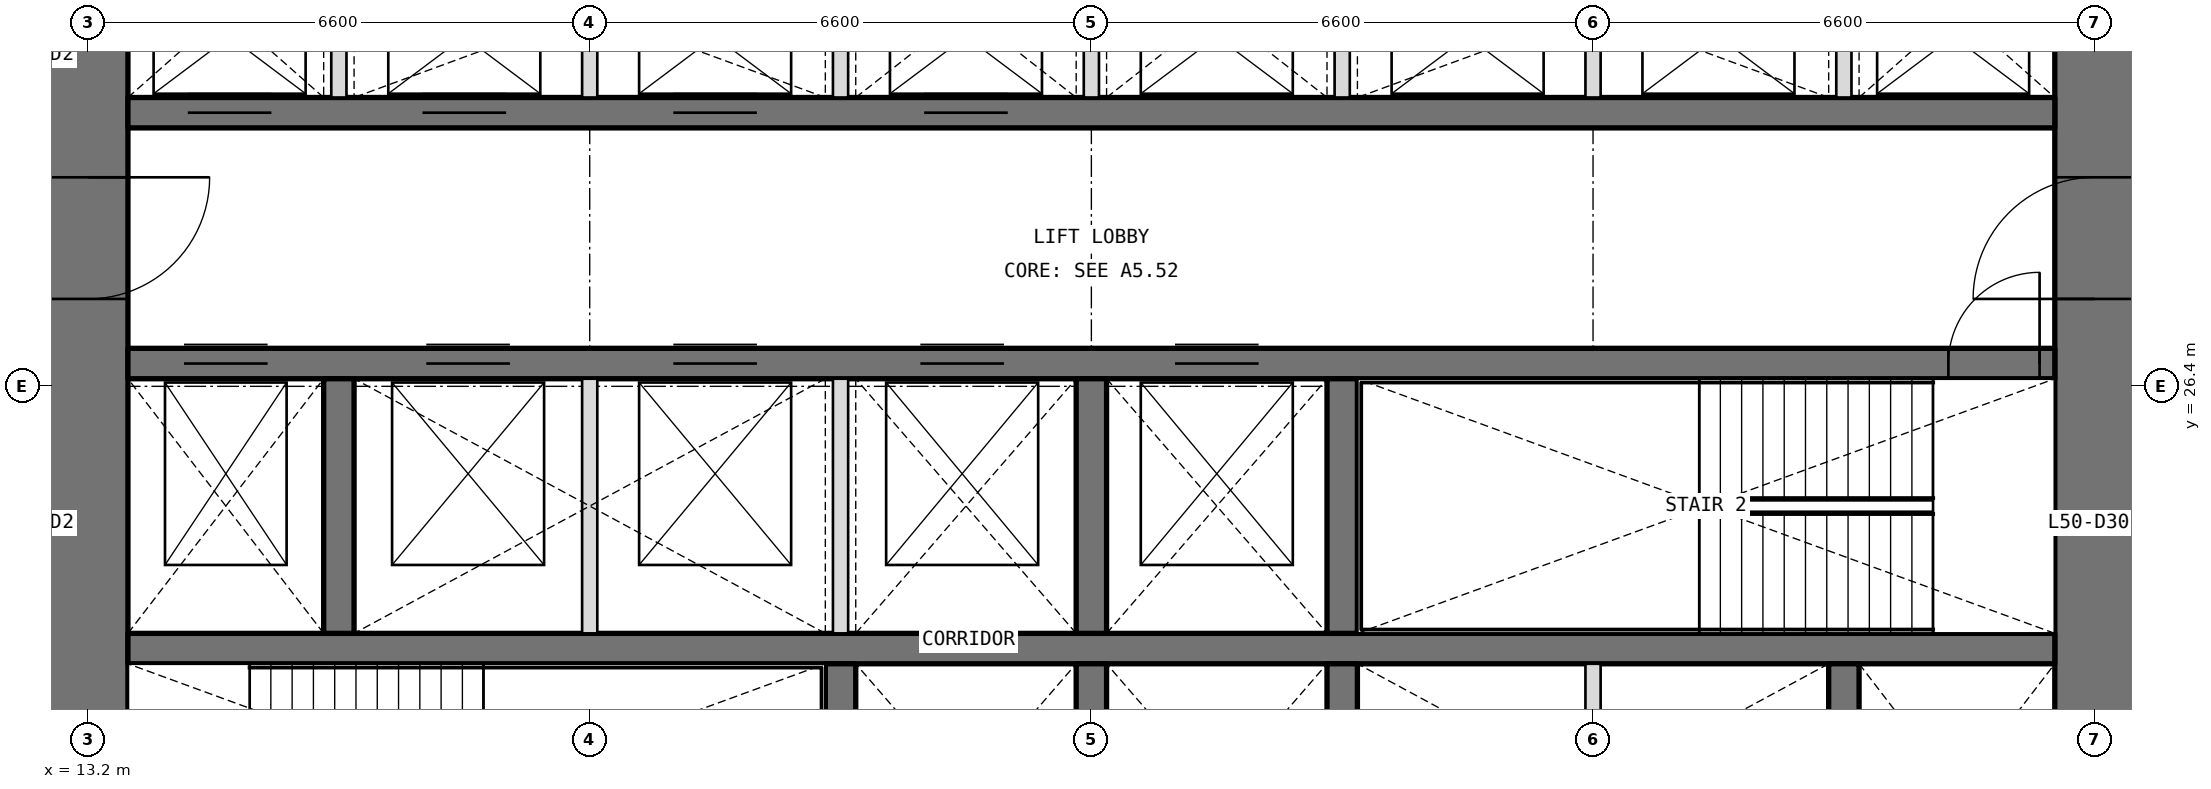
"""IFC4 building model, lengths in metres.
Left out: names, types, materials, properties, quantities, classifications, styles, units other than length and angle.
Written with IfcOpenShell. Run it as: python <this file> out.ifc"""

import sys

from ifc_helpers import new_model, si_unit, direction, frame, frame_2d, origin, place, context, subcontext, project, spatial, rectangle, extrude, element, fill, save


model = new_model("IFC4")
c1 = context("Model", 3, precision=1e-05, world=origin(), true_north=direction((0.0, 1.0)))
c2 = subcontext(c1, "Body", "Model", "MODEL_VIEW")
j1 = project(units=[si_unit("LENGTHUNIT", "METRE"), si_unit("PLANEANGLEUNIT", "RADIAN")], contexts=[c1])
p1 = place(None, origin())
s1 = spatial("IfcSite", under=j1, at=p1, CompositionType="ELEMENT")
p2 = place(p1, origin())
s2 = spatial("IfcBuilding", under=s1, at=p2, CompositionType="ELEMENT")
p3 = place(p2, frame((0.0, 0.0, 218.7)))
s3 = spatial("IfcBuildingStorey", under=s2, at=p3, CompositionType="ELEMENT", Elevation=218.7)
p4 = place(p3, frame((39.6, 13.725, 0.0), z_axis=(0.0, 0.0, 1.0), x_axis=(0.0, 1.0, 0.0)))
e1 = element("IfcWall", 1, at=p4, inside=s3, PredefinedType="SHEAR", context=c2, shape_type="SweptSolid", body=[
    extrude(rectangle(XDim=18.75, YDim=1.05, at=frame_2d((9.375, 0.0))), origin(), (0.0, 0.0, 1.0), 4.2),
])
p5 = place(p4, frame((3.025, 0.0, 0.0)))
e2 = element("IfcOpeningElement", 2, at=p5, cuts=e1, PredefinedType="OPENING", context=c2, shape_type="SweptSolid", body=[
    extrude(rectangle(XDim=1.6, YDim=2.1, at=frame_2d((0.8, 1.05))), frame((0.0, 0.535, 0.0), z_axis=(0.0, -1.0, 0.0), x_axis=(1.0, 0.0, 0.0)), (0.0, 0.0, 1.0), 1.07),
])
p6 = place(p4, frame((13.825, 0.0, 0.0)))
e3 = element("IfcOpeningElement", 3, at=p6, cuts=e1, PredefinedType="OPENING", context=c2, shape_type="SweptSolid", body=[
    extrude(rectangle(XDim=1.6, YDim=2.1, at=frame_2d((0.8, 1.05))), frame((0.0, 0.535, 0.0), z_axis=(0.0, -1.0, 0.0), x_axis=(1.0, 0.0, 0.0)), (0.0, 0.0, 1.0), 1.07),
])
p7 = place(p3, frame((13.2, 32.475, 0.0), z_axis=(0.0, 0.0, 1.0), x_axis=(0.0, -1.0, 0.0)))
e4 = element("IfcWall", 4, at=p7, inside=s3, PredefinedType="SHEAR", context=c2, shape_type="SweptSolid", body=[
    extrude(rectangle(XDim=18.75, YDim=1.05, at=frame_2d((9.375, 0.0))), origin(), (0.0, 0.0, 1.0), 4.2),
])
p8 = place(p7, frame((14.125, 0.0, 0.0)))
e5 = element("IfcOpeningElement", 5, at=p8, cuts=e4, PredefinedType="OPENING", context=c2, shape_type="SweptSolid", body=[
    extrude(rectangle(XDim=1.6, YDim=2.1, at=frame_2d((0.8, 1.05))), frame((0.0, 0.535, 0.0), z_axis=(0.0, -1.0, 0.0), x_axis=(1.0, 0.0, 0.0)), (0.0, 0.0, 1.0), 1.07),
])
p9 = place(p7, frame((3.325, 0.0, 0.0)))
e6 = element("IfcOpeningElement", 6, at=p9, cuts=e4, PredefinedType="OPENING", context=c2, shape_type="SweptSolid", body=[
    extrude(rectangle(XDim=1.6, YDim=2.1, at=frame_2d((0.8, 1.05))), frame((0.0, 0.535, 0.0), z_axis=(0.0, -1.0, 0.0), x_axis=(1.0, 0.0, 0.0)), (0.0, 0.0, 1.0), 1.07),
])
p10 = place(p3, frame((13.725, 22.95, 0.0), z_axis=(0.0, 0.0, 1.0), x_axis=(1.0, 0.0, 0.0)))
e7 = element("IfcWall", 7, at=p10, inside=s3, PredefinedType="SHEAR", context=c2, shape_type="SweptSolid", body=[
    extrude(rectangle(XDim=25.35, YDim=0.4, at=frame_2d((12.675, 0.0))), origin(), (0.0, 0.0, 1.0), 4.2),
])
p11 = place(p3, frame((13.725, 26.7, 0.0), z_axis=(0.0, 0.0, 1.0), x_axis=(1.0, 0.0, 0.0)))
e8 = element("IfcWall", 8, at=p11, inside=s3, PredefinedType="SHEAR", context=c2, shape_type="SweptSolid", body=[
    extrude(rectangle(XDim=25.35, YDim=0.4, at=frame_2d((12.675, 0.0))), origin(), (0.0, 0.0, 1.0), 4.2),
])
p12 = place(p11, frame((23.95, 0.0, 0.0)))
e9 = element("IfcOpeningElement", 9, at=p12, cuts=e8, PredefinedType="OPENING", context=c2, shape_type="SweptSolid", body=[
    extrude(rectangle(XDim=1.2, YDim=2.1, at=frame_2d((0.6, 1.05))), frame((0.0, 0.21, 0.0), z_axis=(0.0, -1.0, 0.0), x_axis=(1.0, 0.0, 0.0)), (0.0, 0.0, 1.0), 0.42),
])
p13 = place(p11, frame((0.738, 0.0, 0.0)))
e10 = element("IfcOpeningElement", 10, at=p13, cuts=e8, PredefinedType="OPENING", context=c2, shape_type="SweptSolid", body=[
    extrude(rectangle(XDim=1.1, YDim=2.1, at=frame_2d((0.55, 1.05))), frame((0.0, 0.21, 0.0), z_axis=(0.0, -1.0, 0.0), x_axis=(1.0, 0.0, 0.0)), (0.0, 0.0, 1.0), 0.42),
])
p14 = place(p11, frame((3.925, 0.0, 0.0)))
e11 = element("IfcOpeningElement", 11, at=p14, cuts=e8, PredefinedType="OPENING", context=c2, shape_type="SweptSolid", body=[
    extrude(rectangle(XDim=1.1, YDim=2.1, at=frame_2d((0.55, 1.05))), frame((0.0, 0.21, 0.0), z_axis=(0.0, -1.0, 0.0), x_axis=(1.0, 0.0, 0.0)), (0.0, 0.0, 1.0), 0.42),
])
p15 = place(p11, frame((7.175, 0.0, 0.0)))
e12 = element("IfcOpeningElement", 12, at=p15, cuts=e8, PredefinedType="OPENING", context=c2, shape_type="SweptSolid", body=[
    extrude(rectangle(XDim=1.1, YDim=2.1, at=frame_2d((0.55, 1.05))), frame((0.0, 0.21, 0.0), z_axis=(0.0, -1.0, 0.0), x_axis=(1.0, 0.0, 0.0)), (0.0, 0.0, 1.0), 0.42),
])
p16 = place(p11, frame((10.425, 0.0, 0.0)))
e13 = element("IfcOpeningElement", 13, at=p16, cuts=e8, PredefinedType="OPENING", context=c2, shape_type="SweptSolid", body=[
    extrude(rectangle(XDim=1.1, YDim=2.1, at=frame_2d((0.55, 1.05))), frame((0.0, 0.21, 0.0), z_axis=(0.0, -1.0, 0.0), x_axis=(1.0, 0.0, 0.0)), (0.0, 0.0, 1.0), 0.42),
])
p17 = place(p11, frame((13.775, 0.0, 0.0)))
e14 = element("IfcOpeningElement", 14, at=p17, cuts=e8, PredefinedType="OPENING", context=c2, shape_type="SweptSolid", body=[
    extrude(rectangle(XDim=1.1, YDim=2.1, at=frame_2d((0.55, 1.05))), frame((0.0, 0.21, 0.0), z_axis=(0.0, -1.0, 0.0), x_axis=(1.0, 0.0, 0.0)), (0.0, 0.0, 1.0), 0.42),
])
p18 = place(p3, frame((13.725, 30.0, 0.0), z_axis=(0.0, 0.0, 1.0), x_axis=(1.0, 0.0, 0.0)))
e15 = element("IfcWall", 15, at=p18, inside=s3, PredefinedType="SHEAR", context=c2, shape_type="SweptSolid", body=[
    extrude(rectangle(XDim=25.35, YDim=0.4, at=frame_2d((12.675, 0.0))), origin(), (0.0, 0.0, 1.0), 4.2),
])
p19 = place(p18, frame((0.788, 0.0, 0.0)))
e16 = element("IfcOpeningElement", 16, at=p19, cuts=e15, PredefinedType="OPENING", context=c2, shape_type="SweptSolid", body=[
    extrude(rectangle(XDim=1.1, YDim=2.1, at=frame_2d((0.55, 1.05))), frame((0.0, 0.21, 0.0), z_axis=(0.0, -1.0, 0.0), x_axis=(1.0, 0.0, 0.0)), (0.0, 0.0, 1.0), 0.42),
])
p20 = place(p18, frame((3.875, 0.0, 0.0)))
e17 = element("IfcOpeningElement", 17, at=p20, cuts=e15, PredefinedType="OPENING", context=c2, shape_type="SweptSolid", body=[
    extrude(rectangle(XDim=1.1, YDim=2.1, at=frame_2d((0.55, 1.05))), frame((0.0, 0.21, 0.0), z_axis=(0.0, -1.0, 0.0), x_axis=(1.0, 0.0, 0.0)), (0.0, 0.0, 1.0), 0.42),
])
p21 = place(p18, frame((7.175, 0.0, 0.0)))
e18 = element("IfcOpeningElement", 18, at=p21, cuts=e15, PredefinedType="OPENING", context=c2, shape_type="SweptSolid", body=[
    extrude(rectangle(XDim=1.1, YDim=2.1, at=frame_2d((0.55, 1.05))), frame((0.0, 0.21, 0.0), z_axis=(0.0, -1.0, 0.0), x_axis=(1.0, 0.0, 0.0)), (0.0, 0.0, 1.0), 0.42),
])
p22 = place(p18, frame((10.475, 0.0, 0.0)))
e19 = element("IfcOpeningElement", 19, at=p22, cuts=e15, PredefinedType="OPENING", context=c2, shape_type="SweptSolid", body=[
    extrude(rectangle(XDim=1.1, YDim=2.1, at=frame_2d((0.55, 1.05))), frame((0.0, 0.21, 0.0), z_axis=(0.0, -1.0, 0.0), x_axis=(1.0, 0.0, 0.0)), (0.0, 0.0, 1.0), 0.42),
])
for number, where, z_axis, x_axis in (
    (20, (23.1, 19.4, 0.0), (0.0, 0.0, 1.0), (0.0, 1.0, 0.0)),
    (21, (26.4, 19.4, 0.0), (0.0, 0.0, 1.0), (0.0, 1.0, 0.0)),
    (22, (29.7, 19.4, 0.0), (0.0, 0.0, 1.0), (0.0, 1.0, 0.0)),
    (23, (36.3, 19.4, 0.0), (0.0, 0.0, 1.0), (0.0, 1.0, 0.0)),
    (24, (16.5, 23.15, 0.0), (0.0, 0.0, 1.0), (0.0, 1.0, 0.0)),
    (25, (26.4, 23.15, 0.0), (0.0, 0.0, 1.0), (0.0, 1.0, 0.0)),
    (26, (29.7, 23.15, 0.0), (0.0, 0.0, 1.0), (0.0, 1.0, 0.0)),
):
    element("IfcWall", number, at=place(p3, frame(where, z_axis=z_axis, x_axis=x_axis)), inside=s3, PredefinedType="SHEAR", context=c2, shape_type="SweptSolid", body=[
        extrude(rectangle(XDim=3.35, YDim=0.4, at=frame_2d((1.675, 0.0))), origin(), (0.0, 0.0, 1.0), 4.2),
    ])
for number, where, z_axis, x_axis in (
    (27, (16.5, 30.2, 0.0), (0.0, 0.0, 1.0), (0.0, 1.0, 0.0)),
    (28, (19.8, 30.2, 0.0), (0.0, 0.0, 1.0), (0.0, 1.0, 0.0)),
    (29, (23.1, 30.2, 0.0), (0.0, 0.0, 1.0), (0.0, 1.0, 0.0)),
    (30, (26.4, 30.2, 0.0), (0.0, 0.0, 1.0), (0.0, 1.0, 0.0)),
    (31, (29.7, 30.2, 0.0), (0.0, 0.0, 1.0), (0.0, 1.0, 0.0)),
    (32, (33.0, 30.2, 0.0), (0.0, 0.0, 1.0), (0.0, 1.0, 0.0)),
    (33, (36.3, 30.2, 0.0), (0.0, 0.0, 1.0), (0.0, 1.0, 0.0)),
):
    element("IfcWall", number, at=place(p3, frame(where, z_axis=z_axis, x_axis=x_axis)), inside=s3, PredefinedType="PARTITIONING", context=c2, shape_type="SweptSolid", body=[
        extrude(rectangle(XDim=2.275, YDim=0.2, at=frame_2d((1.138, 0.0))), origin(), (0.0, 0.0, 1.0), 4.2),
    ])
for number, where, z_axis, x_axis in (
    (34, (33.0, 19.4, 0.0), (0.0, 0.0, 1.0), (0.0, 1.0, 0.0)),
    (35, (19.8, 23.15, 0.0), (0.0, 0.0, 1.0), (0.0, 1.0, 0.0)),
    (36, (23.1, 23.15, 0.0), (0.0, 0.0, 1.0), (0.0, 1.0, 0.0)),
):
    element("IfcWall", number, at=place(p3, frame(where, z_axis=z_axis, x_axis=x_axis)), inside=s3, PredefinedType="PARTITIONING", context=c2, shape_type="SweptSolid", body=[
        extrude(rectangle(XDim=3.35, YDim=0.2, at=frame_2d((1.675, 0.0))), origin(), (0.0, 0.0, 1.0), 4.2),
    ])
p23 = place(p12, origin())
e37 = element("IfcDoor", 37, at=p23, inside=s3, OperationType="SINGLE_SWING_RIGHT", PredefinedType="DOOR", context=c2, shape_type="SweptSolid", body=[
    extrude(rectangle(XDim=1.2, YDim=2.1, at=frame_2d((0.6, 1.05))), frame((0.0, 0.025, 0.0), z_axis=(0.0, -1.0, 0.0), x_axis=(1.0, 0.0, 0.0)), (0.0, 0.0, 1.0), 0.05),
])
fill(e9, e37)
p24 = place(p9, origin())
e38 = element("IfcDoor", 38, at=p24, inside=s3, OperationType="DOUBLE_DOOR_DOUBLE_SWING", PredefinedType="DOOR", context=c2, shape_type="SweptSolid", body=[
    extrude(rectangle(XDim=1.6, YDim=2.1, at=frame_2d((0.8, 1.05))), frame((0.0, 0.025, 0.0), z_axis=(0.0, -1.0, 0.0), x_axis=(1.0, 0.0, 0.0)), (0.0, 0.0, 1.0), 0.05),
])
fill(e6, e38)
p25 = place(p6, origin())
e39 = element("IfcDoor", 39, at=p25, inside=s3, OperationType="DOUBLE_DOOR_DOUBLE_SWING", PredefinedType="DOOR", context=c2, shape_type="SweptSolid", body=[
    extrude(rectangle(XDim=1.6, YDim=2.1, at=frame_2d((0.8, 1.05))), frame((0.0, 0.025, 0.0), z_axis=(0.0, -1.0, 0.0), x_axis=(1.0, 0.0, 0.0)), (0.0, 0.0, 1.0), 0.05),
])
fill(e3, e39)
p26 = place(p19, origin())
e40 = element("IfcDoor", 40, at=p26, inside=s3, OperationType="DOUBLE_DOOR_SLIDING", PredefinedType="DOOR", context=c2, shape_type="SweptSolid", body=[
    extrude(rectangle(XDim=1.1, YDim=2.1, at=frame_2d((0.55, 1.05))), frame((0.0, 0.025, 0.0), z_axis=(0.0, -1.0, 0.0), x_axis=(1.0, 0.0, 0.0)), (0.0, 0.0, 1.0), 0.05),
])
fill(e16, e40)
p27 = place(p20, origin())
e41 = element("IfcDoor", 41, at=p27, inside=s3, OperationType="DOUBLE_DOOR_SLIDING", PredefinedType="DOOR", context=c2, shape_type="SweptSolid", body=[
    extrude(rectangle(XDim=1.1, YDim=2.1, at=frame_2d((0.55, 1.05))), frame((0.0, 0.025, 0.0), z_axis=(0.0, -1.0, 0.0), x_axis=(1.0, 0.0, 0.0)), (0.0, 0.0, 1.0), 0.05),
])
fill(e17, e41)
p28 = place(p21, origin())
e42 = element("IfcDoor", 42, at=p28, inside=s3, OperationType="DOUBLE_DOOR_SLIDING", PredefinedType="DOOR", context=c2, shape_type="SweptSolid", body=[
    extrude(rectangle(XDim=1.1, YDim=2.1, at=frame_2d((0.55, 1.05))), frame((0.0, 0.025, 0.0), z_axis=(0.0, -1.0, 0.0), x_axis=(1.0, 0.0, 0.0)), (0.0, 0.0, 1.0), 0.05),
])
fill(e18, e42)
p29 = place(p22, origin())
e43 = element("IfcDoor", 43, at=p29, inside=s3, OperationType="DOUBLE_DOOR_SLIDING", PredefinedType="DOOR", context=c2, shape_type="SweptSolid", body=[
    extrude(rectangle(XDim=1.1, YDim=2.1, at=frame_2d((0.55, 1.05))), frame((0.0, 0.025, 0.0), z_axis=(0.0, -1.0, 0.0), x_axis=(1.0, 0.0, 0.0)), (0.0, 0.0, 1.0), 0.05),
])
fill(e19, e43)
p30 = place(p13, origin())
e44 = element("IfcDoor", 44, at=p30, inside=s3, OperationType="DOUBLE_DOOR_SLIDING", PredefinedType="DOOR", context=c2, shape_type="SweptSolid", body=[
    extrude(rectangle(XDim=1.1, YDim=2.1, at=frame_2d((0.55, 1.05))), frame((0.0, 0.025, 0.0), z_axis=(0.0, -1.0, 0.0), x_axis=(1.0, 0.0, 0.0)), (0.0, 0.0, 1.0), 0.05),
])
fill(e10, e44)
p31 = place(p14, origin())
e45 = element("IfcDoor", 45, at=p31, inside=s3, OperationType="DOUBLE_DOOR_SLIDING", PredefinedType="DOOR", context=c2, shape_type="SweptSolid", body=[
    extrude(rectangle(XDim=1.1, YDim=2.1, at=frame_2d((0.55, 1.05))), frame((0.0, 0.025, 0.0), z_axis=(0.0, -1.0, 0.0), x_axis=(1.0, 0.0, 0.0)), (0.0, 0.0, 1.0), 0.05),
])
fill(e11, e45)
p32 = place(p15, origin())
e46 = element("IfcDoor", 46, at=p32, inside=s3, OperationType="DOUBLE_DOOR_SLIDING", PredefinedType="DOOR", context=c2, shape_type="SweptSolid", body=[
    extrude(rectangle(XDim=1.1, YDim=2.1, at=frame_2d((0.55, 1.05))), frame((0.0, 0.025, 0.0), z_axis=(0.0, -1.0, 0.0), x_axis=(1.0, 0.0, 0.0)), (0.0, 0.0, 1.0), 0.05),
])
fill(e12, e46)
p33 = place(p16, origin())
e47 = element("IfcDoor", 47, at=p33, inside=s3, OperationType="DOUBLE_DOOR_SLIDING", PredefinedType="DOOR", context=c2, shape_type="SweptSolid", body=[
    extrude(rectangle(XDim=1.1, YDim=2.1, at=frame_2d((0.55, 1.05))), frame((0.0, 0.025, 0.0), z_axis=(0.0, -1.0, 0.0), x_axis=(1.0, 0.0, 0.0)), (0.0, 0.0, 1.0), 0.05),
])
fill(e13, e47)
p34 = place(p17, origin())
e48 = element("IfcDoor", 48, at=p34, inside=s3, OperationType="DOUBLE_DOOR_SLIDING", PredefinedType="DOOR", context=c2, shape_type="SweptSolid", body=[
    extrude(rectangle(XDim=1.1, YDim=2.1, at=frame_2d((0.55, 1.05))), frame((0.0, 0.025, 0.0), z_axis=(0.0, -1.0, 0.0), x_axis=(1.0, 0.0, 0.0)), (0.0, 0.0, 1.0), 0.05),
])
fill(e14, e48)
save(model, sys.argv[1])
